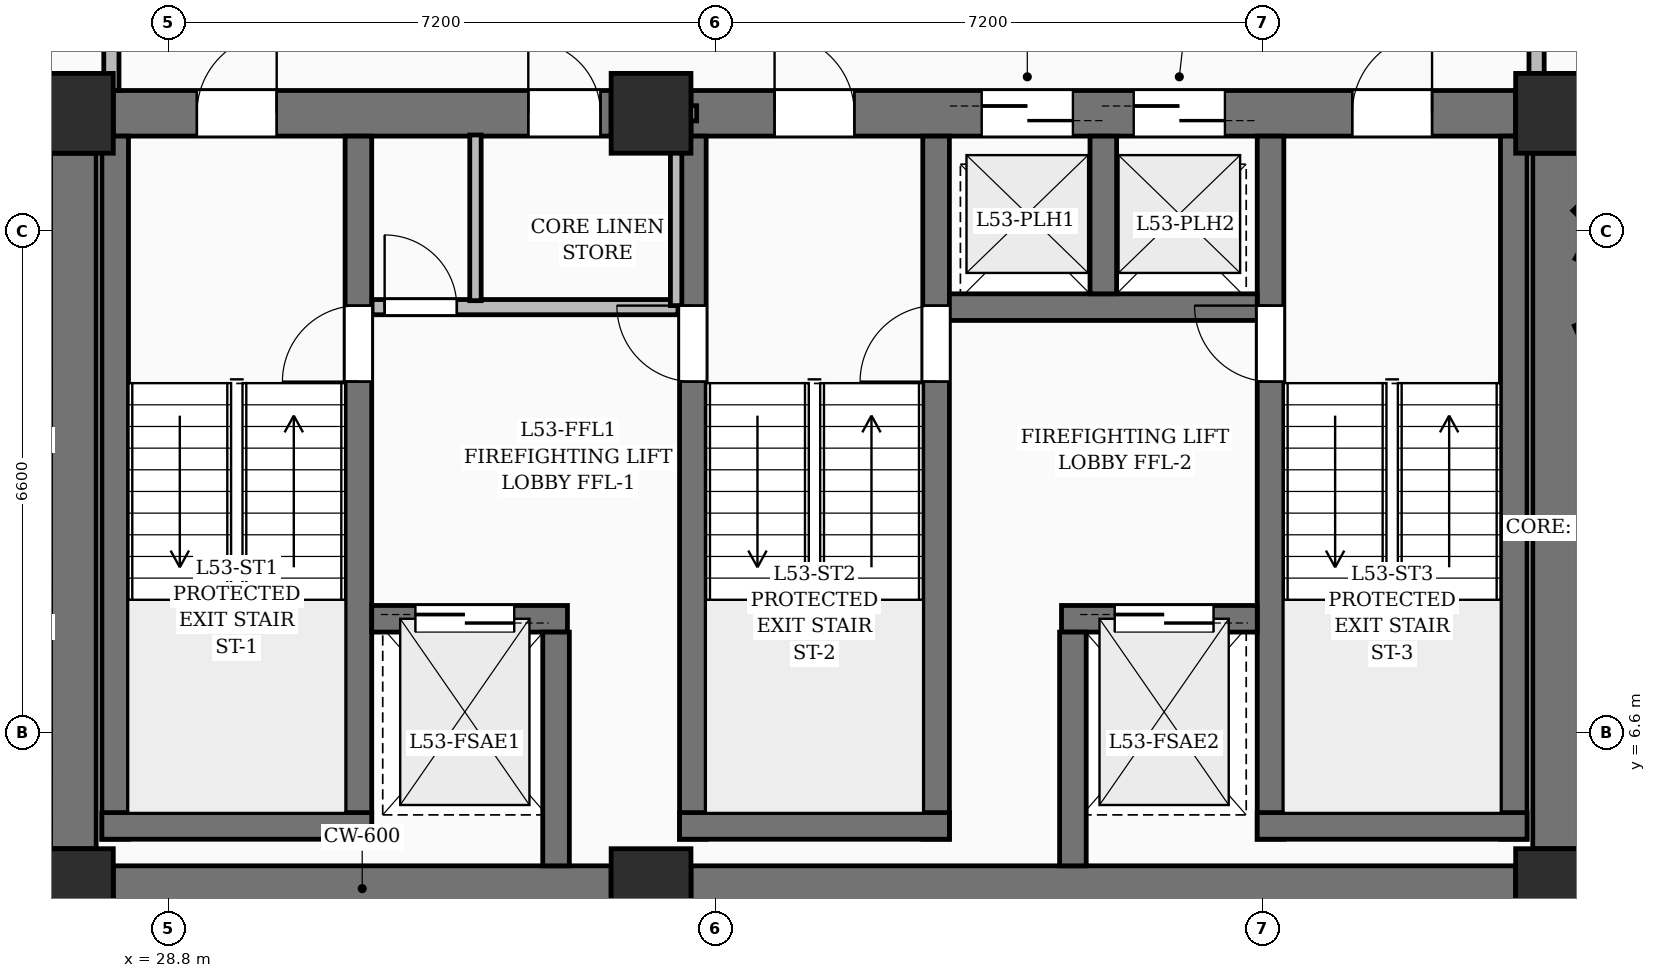
"""IFC4 building model, lengths in metres.
Left out: names, types, materials, properties, quantities, classifications, styles, units other than length and angle.
Written with IfcOpenShell. Run it as: python <this file> out.ifc"""

import sys

from ifc_helpers import new_model, si_unit, direction, frame, frame_2d, origin, origin_2d, place, context, subcontext, project, spatial, rectangle, extrude, element, fill, save


model = new_model("IFC4")
c1 = context("Model", 3, precision=1e-05, world=origin(), true_north=direction((0.0, 1.0)))
c2 = subcontext(c1, "Body", "Model", "MODEL_VIEW")
j1 = project(units=[si_unit("LENGTHUNIT", "METRE"), si_unit("PLANEANGLEUNIT", "RADIAN")], contexts=[c1])
p1 = place(None, origin())
s1 = spatial("IfcSite", under=j1, at=p1, CompositionType="ELEMENT")
p2 = place(p1, origin())
s2 = spatial("IfcBuilding", under=s1, at=p2, CompositionType="ELEMENT")
p3 = place(p2, frame((0.0, 0.0, 207.0)))
s3 = spatial("IfcBuildingStorey", under=s2, at=p3, CompositionType="ELEMENT", Elevation=207.0)
for number, where, z_axis, x_axis in (
    (1, (27.55, 4.55, 0.0), (0.0, 0.0, 1.0), (1.0, 0.0, 0.0)),
    (2, (35.15, 4.55, 0.0), (0.0, 0.0, 1.0), (1.0, 0.0, 0.0)),
    (3, (47.05, 4.55, 0.0), (0.0, 0.0, 1.0), (1.0, 0.0, 0.0)),
    (4, (27.55, 14.75, 0.0), (0.0, 0.0, 1.0), (1.0, 0.0, 0.0)),
    (5, (35.15, 14.75, 0.0), (0.0, 0.0, 1.0), (1.0, 0.0, 0.0)),
    (6, (47.05, 14.75, 0.0), (0.0, 0.0, 1.0), (1.0, 0.0, 0.0)),
):
    element("IfcColumn", number, at=place(p3, frame(where, z_axis=z_axis, x_axis=x_axis)), inside=s3, PredefinedType="COLUMN", context=c2, shape_type="SweptSolid", body=[
        extrude(rectangle(XDim=1.05, YDim=1.05, at=origin_2d()), origin(), (0.0, 0.0, 1.0), 3.75),
    ])
p4 = place(p3, frame((28.075, 4.55, 0.0), z_axis=(0.0, 0.0, 1.0), x_axis=(1.0, 0.0, 0.0)))
e7 = element("IfcWall", 7, at=p4, inside=s3, PredefinedType="SHEAR", context=c2, shape_type="SweptSolid", body=[
    extrude(rectangle(XDim=6.55, YDim=0.6, at=frame_2d((3.275, 0.0))), origin(), (0.0, 0.0, 1.0), 3.75),
])
p5 = place(p3, frame((35.675, 4.55, 0.0), z_axis=(0.0, 0.0, 1.0), x_axis=(1.0, 0.0, 0.0)))
e8 = element("IfcWall", 8, at=p5, inside=s3, PredefinedType="SHEAR", context=c2, shape_type="SweptSolid", body=[
    extrude(rectangle(XDim=10.85, YDim=0.6, at=frame_2d((5.425, 0.0))), origin(), (0.0, 0.0, 1.0), 3.75),
])
p6 = place(p3, frame((28.075, 14.75, 0.0), z_axis=(0.0, 0.0, 1.0), x_axis=(1.0, 0.0, 0.0)))
e9 = element("IfcWall", 9, at=p6, inside=s3, PredefinedType="SHEAR", context=c2, shape_type="SweptSolid", body=[
    extrude(rectangle(XDim=6.55, YDim=0.6, at=frame_2d((3.275, 0.0))), origin(), (0.0, 0.0, 1.0), 3.75),
])
p7 = place(p6, frame((1.1, 0.0, 0.0)))
e10 = element("IfcOpeningElement", 10, at=p7, cuts=e9, PredefinedType="OPENING", context=c2, shape_type="SweptSolid", body=[
    extrude(rectangle(XDim=1.05, YDim=2.15, at=frame_2d((0.525, 1.075))), frame((0.0, 0.31, 0.0), z_axis=(0.0, -1.0, 0.0), x_axis=(1.0, 0.0, 0.0)), (0.0, 0.0, 1.0), 0.62),
])
p8 = place(p6, frame((5.46, 0.0, 0.0)))
e11 = element("IfcOpeningElement", 11, at=p8, cuts=e9, PredefinedType="OPENING", context=c2, shape_type="SweptSolid", body=[
    extrude(rectangle(XDim=0.95, YDim=2.15, at=frame_2d((0.475, 1.075))), frame((0.0, 0.31, 0.0), z_axis=(0.0, -1.0, 0.0), x_axis=(1.0, 0.0, 0.0)), (0.0, 0.0, 1.0), 0.62),
])
p9 = place(p3, frame((35.675, 14.75, 0.0), z_axis=(0.0, 0.0, 1.0), x_axis=(1.0, 0.0, 0.0)))
e12 = element("IfcWall", 12, at=p9, inside=s3, PredefinedType="SHEAR", context=c2, shape_type="SweptSolid", body=[
    extrude(rectangle(XDim=10.85, YDim=0.6, at=frame_2d((5.425, 0.0))), origin(), (0.0, 0.0, 1.0), 3.75),
])
p10 = place(p9, frame((1.1, 0.0, 0.0)))
e13 = element("IfcOpeningElement", 13, at=p10, cuts=e12, PredefinedType="OPENING", context=c2, shape_type="SweptSolid", body=[
    extrude(rectangle(XDim=1.05, YDim=2.15, at=frame_2d((0.525, 1.075))), frame((0.0, 0.31, 0.0), z_axis=(0.0, -1.0, 0.0), x_axis=(1.0, 0.0, 0.0)), (0.0, 0.0, 1.0), 0.62),
])
p11 = place(p9, frame((8.7, 0.0, 0.0)))
e14 = element("IfcOpeningElement", 14, at=p11, cuts=e12, PredefinedType="OPENING", context=c2, shape_type="SweptSolid", body=[
    extrude(rectangle(XDim=1.05, YDim=2.15, at=frame_2d((0.525, 1.075))), frame((0.0, 0.31, 0.0), z_axis=(0.0, -1.0, 0.0), x_axis=(1.0, 0.0, 0.0)), (0.0, 0.0, 1.0), 0.62),
])
p12 = place(p9, frame((3.825, 0.0, 0.0)))
e15 = element("IfcOpeningElement", 15, at=p12, cuts=e12, PredefinedType="OPENING", context=c2, shape_type="SweptSolid", body=[
    extrude(rectangle(XDim=1.2, YDim=2.2, at=frame_2d((0.6, 1.1))), frame((0.0, 0.31, 0.0), z_axis=(0.0, -1.0, 0.0), x_axis=(1.0, 0.0, 0.0)), (0.0, 0.0, 1.0), 0.62),
])
p13 = place(p9, frame((5.825, 0.0, 0.0)))
e16 = element("IfcOpeningElement", 16, at=p13, cuts=e12, PredefinedType="OPENING", context=c2, shape_type="SweptSolid", body=[
    extrude(rectangle(XDim=1.2, YDim=2.2, at=frame_2d((0.6, 1.1))), frame((0.0, 0.31, 0.0), z_axis=(0.0, -1.0, 0.0), x_axis=(1.0, 0.0, 0.0)), (0.0, 0.0, 1.0), 0.62),
])
for number, where, z_axis, x_axis in (
    (17, (27.55, 5.075, 0.0), (0.0, 0.0, 1.0), (0.0, 1.0, 0.0)),
    (18, (47.05, 5.075, 0.0), (0.0, 0.0, 1.0), (0.0, 1.0, 0.0)),
):
    element("IfcWall", number, at=place(p3, frame(where, z_axis=z_axis, x_axis=x_axis)), inside=s3, PredefinedType="SHEAR", context=c2, shape_type="SweptSolid", body=[
        extrude(rectangle(XDim=9.15, YDim=0.6, at=frame_2d((4.575, 0.0))), origin(), (0.0, 0.0, 1.0), 3.75),
    ])
p14 = place(p3, frame((28.1, 5.2, 0.0), z_axis=(0.0, 0.0, 1.0), x_axis=(0.0, 1.0, 0.0)))
e19 = element("IfcWall", 19, at=p14, inside=s3, PredefinedType="SOLIDWALL", context=c2, shape_type="SweptSolid", body=[
    extrude(rectangle(XDim=9.25, YDim=0.35, at=frame_2d((4.625, 0.0))), origin(), (0.0, 0.0, 1.0), 3.75),
])
p15 = place(p3, frame((31.3, 5.2, 0.0), z_axis=(0.0, 0.0, 1.0), x_axis=(0.0, 1.0, 0.0)))
e20 = element("IfcWall", 20, at=p15, inside=s3, PredefinedType="SOLIDWALL", context=c2, shape_type="SweptSolid", body=[
    extrude(rectangle(XDim=9.25, YDim=0.35, at=frame_2d((4.625, 0.0))), origin(), (0.0, 0.0, 1.0), 3.75),
])
p16 = place(p15, frame((6.02, 0.0, 0.0)))
e21 = element("IfcOpeningElement", 21, at=p16, cuts=e20, PredefinedType="OPENING", context=c2, shape_type="SweptSolid", body=[
    extrude(rectangle(XDim=1.0, YDim=2.15, at=frame_2d((0.5, 1.075))), frame((0.0, 0.185, 0.0), z_axis=(0.0, -1.0, 0.0), x_axis=(1.0, 0.0, 0.0)), (0.0, 0.0, 1.0), 0.37),
])
p17 = place(p3, frame((27.925, 5.375, 0.0), z_axis=(0.0, 0.0, 1.0), x_axis=(1.0, 0.0, 0.0)))
e22 = element("IfcWall", 22, at=p17, inside=s3, PredefinedType="SOLIDWALL", context=c2, shape_type="SweptSolid", body=[
    extrude(rectangle(XDim=3.55, YDim=0.35, at=frame_2d((1.775, 0.0))), origin(), (0.0, 0.0, 1.0), 3.75),
])
p18 = place(p3, frame((35.7, 5.2, 0.0), z_axis=(0.0, 0.0, 1.0), x_axis=(0.0, 1.0, 0.0)))
e23 = element("IfcWall", 23, at=p18, inside=s3, PredefinedType="SOLIDWALL", context=c2, shape_type="SweptSolid", body=[
    extrude(rectangle(XDim=9.25, YDim=0.35, at=frame_2d((4.625, 0.0))), origin(), (0.0, 0.0, 1.0), 3.75),
])
p19 = place(p18, frame((6.02, 0.0, 0.0)))
e24 = element("IfcOpeningElement", 24, at=p19, cuts=e23, PredefinedType="OPENING", context=c2, shape_type="SweptSolid", body=[
    extrude(rectangle(XDim=1.0, YDim=2.15, at=frame_2d((0.5, 1.075))), frame((0.0, 0.185, 0.0), z_axis=(0.0, -1.0, 0.0), x_axis=(1.0, 0.0, 0.0)), (0.0, 0.0, 1.0), 0.37),
])
p20 = place(p3, frame((38.9, 5.2, 0.0), z_axis=(0.0, 0.0, 1.0), x_axis=(0.0, 1.0, 0.0)))
e25 = element("IfcWall", 25, at=p20, inside=s3, PredefinedType="SOLIDWALL", context=c2, shape_type="SweptSolid", body=[
    extrude(rectangle(XDim=9.25, YDim=0.35, at=frame_2d((4.625, 0.0))), origin(), (0.0, 0.0, 1.0), 3.75),
])
p21 = place(p20, frame((6.02, 0.0, 0.0)))
e26 = element("IfcOpeningElement", 26, at=p21, cuts=e25, PredefinedType="OPENING", context=c2, shape_type="SweptSolid", body=[
    extrude(rectangle(XDim=1.0, YDim=2.15, at=frame_2d((0.5, 1.075))), frame((0.0, 0.185, 0.0), z_axis=(0.0, -1.0, 0.0), x_axis=(1.0, 0.0, 0.0)), (0.0, 0.0, 1.0), 0.37),
])
p22 = place(p3, frame((35.525, 5.375, 0.0), z_axis=(0.0, 0.0, 1.0), x_axis=(1.0, 0.0, 0.0)))
e27 = element("IfcWall", 27, at=p22, inside=s3, PredefinedType="SOLIDWALL", context=c2, shape_type="SweptSolid", body=[
    extrude(rectangle(XDim=3.55, YDim=0.35, at=frame_2d((1.775, 0.0))), origin(), (0.0, 0.0, 1.0), 3.75),
])
p23 = place(p3, frame((43.3, 5.2, 0.0), z_axis=(0.0, 0.0, 1.0), x_axis=(0.0, 1.0, 0.0)))
e28 = element("IfcWall", 28, at=p23, inside=s3, PredefinedType="SOLIDWALL", context=c2, shape_type="SweptSolid", body=[
    extrude(rectangle(XDim=9.25, YDim=0.35, at=frame_2d((4.625, 0.0))), origin(), (0.0, 0.0, 1.0), 3.75),
])
p24 = place(p23, frame((6.02, 0.0, 0.0)))
e29 = element("IfcOpeningElement", 29, at=p24, cuts=e28, PredefinedType="OPENING", context=c2, shape_type="SweptSolid", body=[
    extrude(rectangle(XDim=1.0, YDim=2.15, at=frame_2d((0.5, 1.075))), frame((0.0, 0.185, 0.0), z_axis=(0.0, -1.0, 0.0), x_axis=(1.0, 0.0, 0.0)), (0.0, 0.0, 1.0), 0.37),
])
p25 = place(p3, frame((46.5, 5.2, 0.0), z_axis=(0.0, 0.0, 1.0), x_axis=(0.0, 1.0, 0.0)))
e30 = element("IfcWall", 30, at=p25, inside=s3, PredefinedType="SOLIDWALL", context=c2, shape_type="SweptSolid", body=[
    extrude(rectangle(XDim=9.25, YDim=0.35, at=frame_2d((4.625, 0.0))), origin(), (0.0, 0.0, 1.0), 3.75),
])
p26 = place(p3, frame((43.125, 5.375, 0.0), z_axis=(0.0, 0.0, 1.0), x_axis=(1.0, 0.0, 0.0)))
e31 = element("IfcWall", 31, at=p26, inside=s3, PredefinedType="SOLIDWALL", context=c2, shape_type="SweptSolid", body=[
    extrude(rectangle(XDim=3.55, YDim=0.35, at=frame_2d((1.775, 0.0))), origin(), (0.0, 0.0, 1.0), 3.75),
])
p27 = place(p3, frame((31.475, 8.1, 0.0), z_axis=(0.0, 0.0, 1.0), x_axis=(1.0, 0.0, 0.0)))
e32 = element("IfcWall", 32, at=p27, inside=s3, PredefinedType="SOLIDWALL", context=c2, shape_type="SweptSolid", body=[
    extrude(rectangle(XDim=2.575, YDim=0.35, at=frame_2d((1.288, 0.0))), origin(), (0.0, 0.0, 1.0), 3.75),
])
p28 = place(p27, frame((0.575, 0.0, 0.0)))
e33 = element("IfcOpeningElement", 33, at=p28, cuts=e32, PredefinedType="OPENING", context=c2, shape_type="SweptSolid", body=[
    extrude(rectangle(XDim=1.3, YDim=2.25, at=frame_2d((0.65, 1.125))), frame((0.0, 0.185, 0.0), z_axis=(0.0, -1.0, 0.0), x_axis=(1.0, 0.0, 0.0)), (0.0, 0.0, 1.0), 0.37),
])
p29 = place(p3, frame((40.55, 8.1, 0.0), z_axis=(0.0, 0.0, 1.0), x_axis=(1.0, 0.0, 0.0)))
e34 = element("IfcWall", 34, at=p29, inside=s3, PredefinedType="SOLIDWALL", context=c2, shape_type="SweptSolid", body=[
    extrude(rectangle(XDim=2.575, YDim=0.35, at=frame_2d((1.288, 0.0))), origin(), (0.0, 0.0, 1.0), 3.75),
])
p30 = place(p29, frame((0.7, 0.0, 0.0)))
e35 = element("IfcOpeningElement", 35, at=p30, cuts=e34, PredefinedType="OPENING", context=c2, shape_type="SweptSolid", body=[
    extrude(rectangle(XDim=1.3, YDim=2.25, at=frame_2d((0.65, 1.125))), frame((0.0, 0.185, 0.0), z_axis=(0.0, -1.0, 0.0), x_axis=(1.0, 0.0, 0.0)), (0.0, 0.0, 1.0), 0.37),
])
for number, where, z_axis, x_axis in (
    (36, (33.9, 4.85, 0.0), (0.0, 0.0, 1.0), (0.0, 1.0, 0.0)),
    (37, (40.7, 4.85, 0.0), (0.0, 0.0, 1.0), (0.0, 1.0, 0.0)),
):
    element("IfcWall", number, at=place(p3, frame(where, z_axis=z_axis, x_axis=x_axis)), inside=s3, PredefinedType="SOLIDWALL", context=c2, shape_type="SweptSolid", body=[
        extrude(rectangle(XDim=3.075, YDim=0.35, at=frame_2d((1.538, 0.0))), origin(), (0.0, 0.0, 1.0), 3.75),
    ])
p31 = place(p3, frame((39.075, 12.2, 0.0), z_axis=(0.0, 0.0, 1.0), x_axis=(1.0, 0.0, 0.0)))
e38 = element("IfcWall", 38, at=p31, inside=s3, PredefinedType="SOLIDWALL", context=c2, shape_type="SweptSolid", body=[
    extrude(rectangle(XDim=4.05, YDim=0.35, at=frame_2d((2.025, 0.0))), origin(), (0.0, 0.0, 1.0), 3.75),
])
p32 = place(p3, frame((41.1, 12.375, 0.0), z_axis=(0.0, 0.0, 1.0), x_axis=(0.0, 1.0, 0.0)))
e39 = element("IfcWall", 39, at=p32, inside=s3, PredefinedType="SOLIDWALL", context=c2, shape_type="SweptSolid", body=[
    extrude(rectangle(XDim=2.075, YDim=0.35, at=frame_2d((1.038, 0.0))), origin(), (0.0, 0.0, 1.0), 3.75),
])
p33 = place(p3, frame((34.72, 14.75, 0.0), z_axis=(0.0, 0.0, 1.0), x_axis=(1.0, 0.0, 0.0)))
e40 = element("IfcWall", 40, at=p33, inside=s3, PredefinedType="PARTITIONING", context=c2, shape_type="SweptSolid", body=[
    extrude(rectangle(XDim=1.03, YDim=0.2, at=frame_2d((0.515, 0.0))), origin(), (0.0, 0.0, 1.0), 2.685),
])
p34 = place(p3, frame((31.48, 12.2, 0.0), z_axis=(0.0, 0.0, 1.0), x_axis=(1.0, 0.0, 0.0)))
e41 = element("IfcWall", 41, at=p34, inside=s3, PredefinedType="PARTITIONING", context=c2, shape_type="SweptSolid", body=[
    extrude(rectangle(XDim=4.025, YDim=0.2, at=frame_2d((2.012, 0.0))), origin(), (0.0, 0.0, 1.0), 3.5),
])
p35 = place(p34, frame((0.165, 0.0, 0.0)))
e42 = element("IfcOpeningElement", 42, at=p35, cuts=e41, PredefinedType="OPENING", context=c2, shape_type="SweptSolid", body=[
    extrude(rectangle(XDim=0.95, YDim=2.15, at=frame_2d((0.475, 1.075))), frame((0.0, 0.11, 0.0), z_axis=(0.0, -1.0, 0.0), x_axis=(1.0, 0.0, 0.0)), (0.0, 0.0, 1.0), 0.22),
])
p36 = place(p3, frame((32.84, 12.285, 0.0), z_axis=(0.0, 0.0, 1.0), x_axis=(0.0, 1.0, 0.0)))
e43 = element("IfcWall", 43, at=p36, inside=s3, PredefinedType="PARTITIONING", context=c2, shape_type="SweptSolid", body=[
    extrude(rectangle(XDim=2.18, YDim=0.15, at=frame_2d((1.09, 0.0))), origin(), (0.0, 0.0, 1.0), 2.685),
])
p37 = place(p3, frame((35.48, 12.22, 0.0), z_axis=(0.0, 0.0, 1.0), x_axis=(0.0, 1.0, 0.0)))
e44 = element("IfcWall", 44, at=p37, inside=s3, PredefinedType="PARTITIONING", context=c2, shape_type="SweptSolid", body=[
    extrude(rectangle(XDim=2.396, YDim=0.15, at=frame_2d((1.198, 0.0))), origin(), (0.0, 0.0, 1.0), 3.5),
])
p38 = place(p3, frame((28.05, 16.75, 0.0), z_axis=(0.0, 0.0, 1.0), x_axis=(0.0, -1.0, 0.0)))
e45 = element("IfcWall", 45, at=p38, inside=s3, PredefinedType="PARTITIONING", context=c2, shape_type="SweptSolid", body=[
    extrude(rectangle(XDim=1.7, YDim=0.2, at=frame_2d((0.85, 0.0))), origin(), (0.0, 0.0, 1.0), 3.5),
])
p39 = place(p3, frame((46.8, 15.05, 0.0), z_axis=(0.0, 0.0, 1.0), x_axis=(0.0, 1.0, 0.0)))
e46 = element("IfcWall", 46, at=p39, inside=s3, PredefinedType="PARTITIONING", context=c2, shape_type="SweptSolid", body=[
    extrude(rectangle(XDim=1.7, YDim=0.2, at=frame_2d((0.85, 0.0))), origin(), (0.0, 0.0, 1.0), 2.685),
])
p40 = place(p3, frame((49.55, 7.19, 0.0), z_axis=(0.0, 0.0, 1.0), x_axis=(-0.410297221829, 0.91195185715, 0.0)))
e47 = element("IfcWall", 47, at=p40, inside=s3, PredefinedType="PARTITIONING", context=c2, shape_type="SweptSolid", body=[
    extrude(rectangle(XDim=5.267, YDim=0.2, at=frame_2d((2.634, 0.0))), origin(), (0.0, 0.0, 1.0), 2.685),
])
p41 = place(p3, frame((48.8, 12.09, 0.0), z_axis=(0.0, 0.0, 1.0), x_axis=(-0.707106781187, 0.707106781187, 0.0)))
e48 = element("IfcWall", 48, at=p41, inside=s3, PredefinedType="PARTITIONING", context=c2, shape_type="SweptSolid", body=[
    extrude(rectangle(XDim=2.051, YDim=0.2, at=frame_2d((1.025, 0.0))), origin(), (0.0, 0.0, 1.0), 3.5),
])
p42 = place(p3, frame((47.35, 12.914, 0.0), z_axis=(0.0, 0.0, 1.0), x_axis=(0.876281108122, -0.481800186331, 0.0)))
e49 = element("IfcWall", 49, at=p42, inside=s3, PredefinedType="PARTITIONING", context=c2, shape_type="SweptSolid", body=[
    extrude(rectangle(XDim=0.87, YDim=0.175, at=frame_2d((0.435, 0.0))), origin(), (0.0, 0.0, 1.0), 3.5),
])
p43 = place(p7, origin())
e50 = element("IfcDoor", 50, at=p43, inside=s3, OperationType="SINGLE_SWING_RIGHT", PredefinedType="DOOR", context=c2, shape_type="SweptSolid", body=[
    extrude(rectangle(XDim=1.05, YDim=2.15, at=frame_2d((0.525, 1.075))), frame((0.0, 0.025, 0.0), z_axis=(0.0, -1.0, 0.0), x_axis=(1.0, 0.0, 0.0)), (0.0, 0.0, 1.0), 0.05),
])
fill(e10, e50)
p44 = place(p10, origin())
e51 = element("IfcDoor", 51, at=p44, inside=s3, OperationType="SINGLE_SWING_LEFT", PredefinedType="DOOR", context=c2, shape_type="SweptSolid", body=[
    extrude(rectangle(XDim=1.05, YDim=2.15, at=frame_2d((0.525, 1.075))), frame((0.0, 0.025, 0.0), z_axis=(0.0, -1.0, 0.0), x_axis=(1.0, 0.0, 0.0)), (0.0, 0.0, 1.0), 0.05),
])
fill(e13, e51)
p45 = place(p11, origin())
e52 = element("IfcDoor", 52, at=p45, inside=s3, OperationType="SINGLE_SWING_RIGHT", PredefinedType="DOOR", context=c2, shape_type="SweptSolid", body=[
    extrude(rectangle(XDim=1.05, YDim=2.15, at=frame_2d((0.525, 1.075))), frame((0.0, 0.025, 0.0), z_axis=(0.0, -1.0, 0.0), x_axis=(1.0, 0.0, 0.0)), (0.0, 0.0, 1.0), 0.05),
])
fill(e14, e52)
p46 = place(p16, origin())
e53 = element("IfcDoor", 53, at=p46, inside=s3, OperationType="SINGLE_SWING_LEFT", PredefinedType="DOOR", context=c2, shape_type="SweptSolid", body=[
    extrude(rectangle(XDim=1.0, YDim=2.15, at=frame_2d((0.5, 1.075))), frame((0.0, 0.025, 0.0), z_axis=(0.0, -1.0, 0.0), x_axis=(1.0, 0.0, 0.0)), (0.0, 0.0, 1.0), 0.05),
])
fill(e21, e53)
p47 = place(p19, origin())
e54 = element("IfcDoor", 54, at=p47, inside=s3, OperationType="SINGLE_SWING_RIGHT", PredefinedType="DOOR", context=c2, shape_type="SweptSolid", body=[
    extrude(rectangle(XDim=1.0, YDim=2.15, at=frame_2d((0.5, 1.075))), frame((0.0, 0.025, 0.0), z_axis=(0.0, -1.0, 0.0), x_axis=(1.0, 0.0, 0.0)), (0.0, 0.0, 1.0), 0.05),
])
fill(e24, e54)
p48 = place(p21, origin())
e55 = element("IfcDoor", 55, at=p48, inside=s3, OperationType="SINGLE_SWING_LEFT", PredefinedType="DOOR", context=c2, shape_type="SweptSolid", body=[
    extrude(rectangle(XDim=1.0, YDim=2.15, at=frame_2d((0.5, 1.075))), frame((0.0, 0.025, 0.0), z_axis=(0.0, -1.0, 0.0), x_axis=(1.0, 0.0, 0.0)), (0.0, 0.0, 1.0), 0.05),
])
fill(e26, e55)
p49 = place(p24, origin())
e56 = element("IfcDoor", 56, at=p49, inside=s3, OperationType="SINGLE_SWING_RIGHT", PredefinedType="DOOR", context=c2, shape_type="SweptSolid", body=[
    extrude(rectangle(XDim=1.0, YDim=2.15, at=frame_2d((0.5, 1.075))), frame((0.0, 0.025, 0.0), z_axis=(0.0, -1.0, 0.0), x_axis=(1.0, 0.0, 0.0)), (0.0, 0.0, 1.0), 0.05),
])
fill(e29, e56)
p50 = place(p28, origin())
e57 = element("IfcDoor", 57, at=p50, inside=s3, OperationType="DOUBLE_DOOR_SLIDING", PredefinedType="DOOR", context=c2, shape_type="SweptSolid", body=[
    extrude(rectangle(XDim=1.3, YDim=2.25, at=frame_2d((0.65, 1.125))), frame((0.0, 0.025, 0.0), z_axis=(0.0, -1.0, 0.0), x_axis=(1.0, 0.0, 0.0)), (0.0, 0.0, 1.0), 0.05),
])
fill(e33, e57)
p51 = place(p30, origin())
e58 = element("IfcDoor", 58, at=p51, inside=s3, OperationType="DOUBLE_DOOR_SLIDING", PredefinedType="DOOR", context=c2, shape_type="SweptSolid", body=[
    extrude(rectangle(XDim=1.3, YDim=2.25, at=frame_2d((0.65, 1.125))), frame((0.0, 0.025, 0.0), z_axis=(0.0, -1.0, 0.0), x_axis=(1.0, 0.0, 0.0)), (0.0, 0.0, 1.0), 0.05),
])
fill(e35, e58)
p52 = place(p12, origin())
e59 = element("IfcDoor", 59, at=p52, inside=s3, OperationType="DOUBLE_DOOR_SLIDING", PredefinedType="DOOR", context=c2, shape_type="SweptSolid", body=[
    extrude(rectangle(XDim=1.2, YDim=2.2, at=frame_2d((0.6, 1.1))), frame((0.0, 0.025, 0.0), z_axis=(0.0, -1.0, 0.0), x_axis=(1.0, 0.0, 0.0)), (0.0, 0.0, 1.0), 0.05),
])
fill(e15, e59)
p53 = place(p13, origin())
e60 = element("IfcDoor", 60, at=p53, inside=s3, OperationType="DOUBLE_DOOR_SLIDING", PredefinedType="DOOR", context=c2, shape_type="SweptSolid", body=[
    extrude(rectangle(XDim=1.2, YDim=2.2, at=frame_2d((0.6, 1.1))), frame((0.0, 0.025, 0.0), z_axis=(0.0, -1.0, 0.0), x_axis=(1.0, 0.0, 0.0)), (0.0, 0.0, 1.0), 0.05),
])
fill(e16, e60)
p54 = place(p35, origin())
e61 = element("IfcDoor", 61, at=p54, inside=s3, OperationType="SINGLE_SWING_LEFT", PredefinedType="DOOR", context=c2, shape_type="SweptSolid", body=[
    extrude(rectangle(XDim=0.95, YDim=2.15, at=frame_2d((0.475, 1.075))), frame((0.0, 0.025, 0.0), z_axis=(0.0, -1.0, 0.0), x_axis=(1.0, 0.0, 0.0)), (0.0, 0.0, 1.0), 0.05),
])
fill(e42, e61)
p55 = place(p8, origin())
e62 = element("IfcDoor", 62, at=p55, inside=s3, OperationType="SINGLE_SWING_LEFT", PredefinedType="DOOR", context=c2, shape_type="SweptSolid", body=[
    extrude(rectangle(XDim=0.95, YDim=2.15, at=frame_2d((0.475, 1.075))), frame((0.0, 0.025, 0.0), z_axis=(0.0, -1.0, 0.0), x_axis=(1.0, 0.0, 0.0)), (0.0, 0.0, 1.0), 0.05),
])
fill(e11, e62)
save(model, sys.argv[1])
